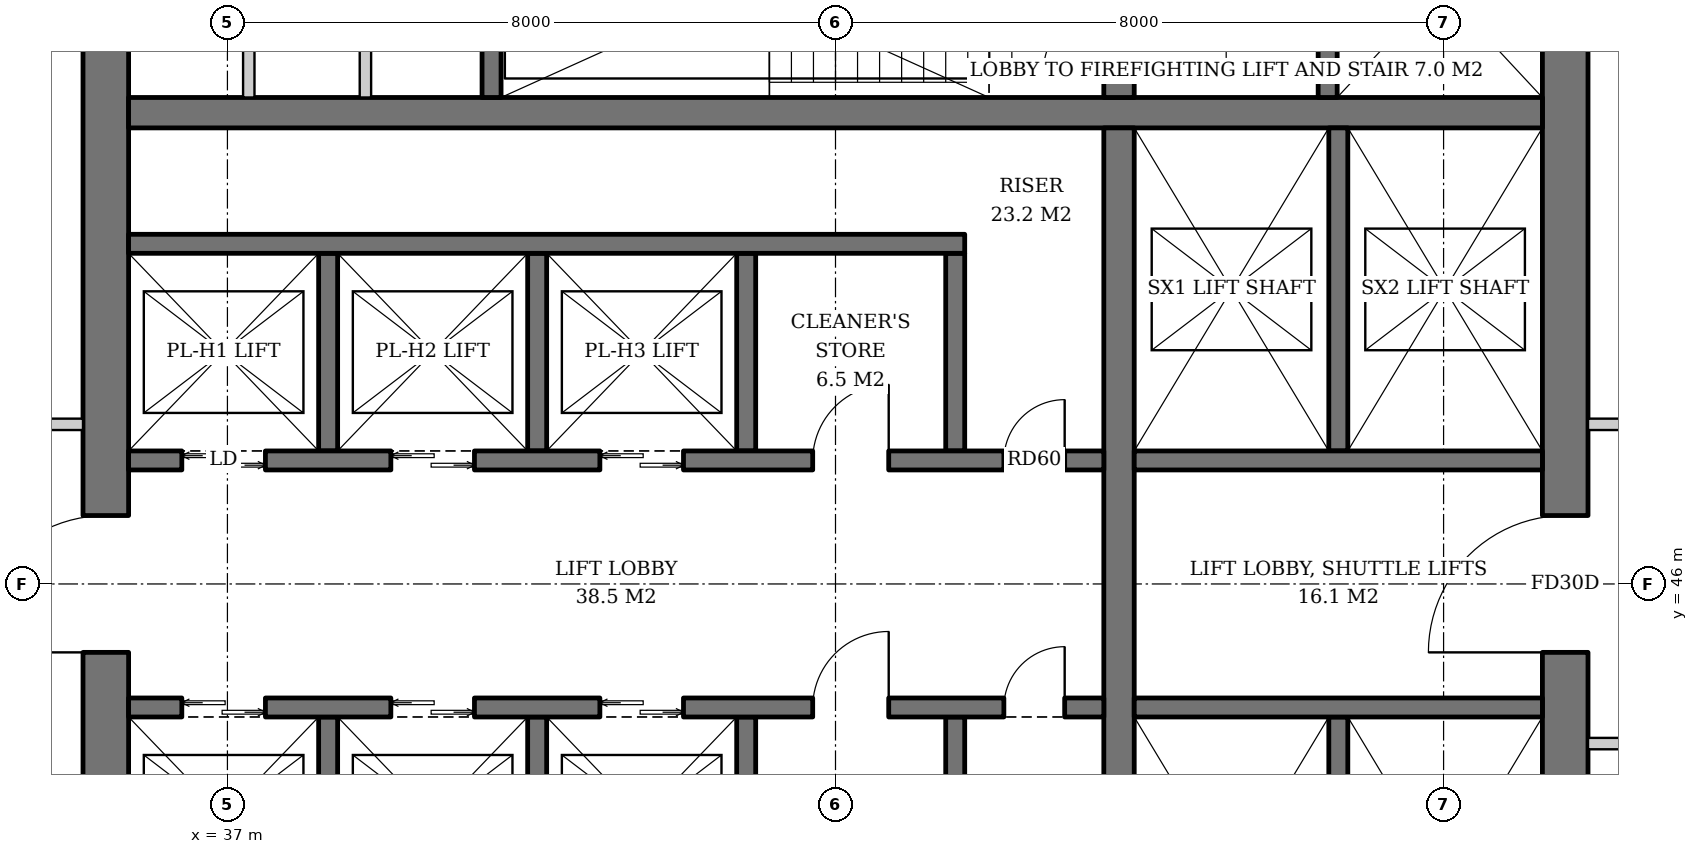
"""IFC4 building model, lengths in metres.
Left out: names, types, materials, properties, quantities, classifications, styles, units other than length and angle.
Written with IfcOpenShell. Run it as: python <this file> out.ifc"""

import sys

from ifc_helpers import new_model, si_unit, direction, frame, frame_2d, origin, place, context, subcontext, project, spatial, rectangle, extrude, element, fill, save


model = new_model("IFC4")
c1 = context("Model", 3, precision=1e-05, world=origin(), true_north=direction((0.0, 1.0)))
c2 = subcontext(c1, "Body", "Model", "MODEL_VIEW")
j1 = project(units=[si_unit("LENGTHUNIT", "METRE"), si_unit("PLANEANGLEUNIT", "RADIAN")], contexts=[c1])
p1 = place(None, origin())
s1 = spatial("IfcSite", under=j1, at=p1, CompositionType="ELEMENT")
p2 = place(p1, origin())
s2 = spatial("IfcBuilding", under=s1, at=p2, CompositionType="ELEMENT")
p3 = place(p2, frame((0.0, 0.0, 211.0)))
s3 = spatial("IfcBuildingStorey", under=s2, at=p3, CompositionType="ELEMENT", Elevation=211.0)
p4 = place(p3, frame((35.4, 36.7, 0.0), z_axis=(0.0, 0.0, 1.0), x_axis=(0.0, 1.0, 0.0)))
e1 = element("IfcWall", 1, at=p4, inside=s3, PredefinedType="SHEAR", context=c2, shape_type="SweptSolid", body=[
    extrude(rectangle(XDim=18.6, YDim=0.6, at=frame_2d((9.3, 0.0))), origin(), (0.0, 0.0, 1.0), 3.8),
])
p5 = place(p4, frame((8.4, 0.0, 0.0)))
e2 = element("IfcOpeningElement", 2, at=p5, cuts=e1, PredefinedType="OPENING", context=c2, shape_type="SweptSolid", body=[
    extrude(rectangle(XDim=1.8, YDim=2.4, at=frame_2d((0.9, 1.2))), frame((0.0, 0.31, 0.0), z_axis=(0.0, -1.0, 0.0), x_axis=(1.0, 0.0, 0.0)), (0.0, 0.0, 1.0), 0.62),
])
p6 = place(p3, frame((54.6, 36.7, 0.0), z_axis=(0.0, 0.0, 1.0), x_axis=(0.0, 1.0, 0.0)))
e3 = element("IfcWall", 3, at=p6, inside=s3, PredefinedType="SHEAR", context=c2, shape_type="SweptSolid", body=[
    extrude(rectangle(XDim=18.6, YDim=0.6, at=frame_2d((9.3, 0.0))), origin(), (0.0, 0.0, 1.0), 3.8),
])
p7 = place(p6, frame((8.4, 0.0, 0.0)))
e4 = element("IfcOpeningElement", 4, at=p7, cuts=e3, PredefinedType="OPENING", context=c2, shape_type="SweptSolid", body=[
    extrude(rectangle(XDim=1.8, YDim=2.4, at=frame_2d((0.9, 1.2))), frame((0.0, 0.31, 0.0), z_axis=(0.0, -1.0, 0.0), x_axis=(1.0, 0.0, 0.0)), (0.0, 0.0, 1.0), 0.62),
])
p8 = place(p3, frame((35.7, 52.2, 0.0), z_axis=(0.0, 0.0, 1.0), x_axis=(1.0, 0.0, 0.0)))
e5 = element("IfcWall", 5, at=p8, inside=s3, PredefinedType="SHEAR", context=c2, shape_type="SweptSolid", body=[
    extrude(rectangle(XDim=18.6, YDim=0.4, at=frame_2d((9.3, 0.0))), origin(), (0.0, 0.0, 1.0), 3.8),
])
p9 = place(p3, frame((48.73, 40.0, 0.0), z_axis=(0.0, 0.0, 1.0), x_axis=(0.0, 1.0, 0.0)))
e6 = element("IfcWall", 6, at=p9, inside=s3, PredefinedType="SHEAR", context=c2, shape_type="SweptSolid", body=[
    extrude(rectangle(XDim=12.0, YDim=0.4, at=frame_2d((6.0, 0.0))), origin(), (0.0, 0.0, 1.0), 3.8),
])
p10 = place(p3, frame((48.73, 52.4, 0.0), z_axis=(0.0, 0.0, 1.0), x_axis=(0.0, 1.0, 0.0)))
e7 = element("IfcWall", 7, at=p10, inside=s3, PredefinedType="SHEAR", context=c2, shape_type="SweptSolid", body=[
    extrude(rectangle(XDim=2.9, YDim=0.4, at=frame_2d((1.45, 0.0))), origin(), (0.0, 0.0, 1.0), 3.8),
])
p11 = place(p10, frame((0.3, 0.0, 0.0)))
e8 = element("IfcOpeningElement", 8, at=p11, cuts=e7, PredefinedType="OPENING", context=c2, shape_type="SweptSolid", body=[
    extrude(rectangle(XDim=1.0, YDim=2.1, at=frame_2d((0.5, 1.05))), frame((0.0, 0.21, 0.0), z_axis=(0.0, -1.0, 0.0), x_axis=(1.0, 0.0, 0.0)), (0.0, 0.0, 1.0), 0.42),
])
p12 = place(p3, frame((40.475, 52.4, 0.0), z_axis=(0.0, 0.0, 1.0), x_axis=(0.0, 1.0, 0.0)))
e9 = element("IfcWall", 9, at=p12, inside=s3, PredefinedType="SHEAR", context=c2, shape_type="SweptSolid", body=[
    extrude(rectangle(XDim=2.9, YDim=0.25, at=frame_2d((1.45, 0.0))), origin(), (0.0, 0.0, 1.0), 3.8),
])
p13 = place(p3, frame((51.475, 52.4, 0.0), z_axis=(0.0, 0.0, 1.0), x_axis=(0.0, 1.0, 0.0)))
e10 = element("IfcWall", 10, at=p13, inside=s3, PredefinedType="SHEAR", context=c2, shape_type="SweptSolid", body=[
    extrude(rectangle(XDim=2.9, YDim=0.25, at=frame_2d((1.45, 0.0))), origin(), (0.0, 0.0, 1.0), 3.8),
])
p14 = place(p13, frame((0.8, 0.0, 0.0)))
e11 = element("IfcOpeningElement", 11, at=p14, cuts=e10, PredefinedType="OPENING", context=c2, shape_type="SweptSolid", body=[
    extrude(rectangle(XDim=1.3, YDim=2.2, at=frame_2d((0.65, 1.1))), frame((0.0, 0.135, 0.0), z_axis=(0.0, -1.0, 0.0), x_axis=(1.0, 0.0, 0.0)), (0.0, 0.0, 1.0), 0.27),
])
for number, where, z_axis, x_axis in (
    (12, (38.325, 47.75, 0.0), (0.0, 0.0, 1.0), (0.0, 1.0, 0.0)),
    (13, (41.075, 47.75, 0.0), (0.0, 0.0, 1.0), (0.0, 1.0, 0.0)),
    (14, (43.825, 47.75, 0.0), (0.0, 0.0, 1.0), (0.0, 1.0, 0.0)),
    (15, (46.575, 47.75, 0.0), (0.0, 0.0, 1.0), (0.0, 1.0, 0.0)),
):
    element("IfcWall", number, at=place(p3, frame(where, z_axis=z_axis, x_axis=x_axis)), inside=s3, PredefinedType="SHEAR", context=c2, shape_type="SweptSolid", body=[
        extrude(rectangle(XDim=2.6, YDim=0.25, at=frame_2d((1.3, 0.0))), origin(), (0.0, 0.0, 1.0), 3.8),
    ])
p15 = place(p3, frame((35.7, 50.475, 0.0), z_axis=(0.0, 0.0, 1.0), x_axis=(1.0, 0.0, 0.0)))
e16 = element("IfcWall", 16, at=p15, inside=s3, PredefinedType="SHEAR", context=c2, shape_type="SweptSolid", body=[
    extrude(rectangle(XDim=11.0, YDim=0.25, at=frame_2d((5.5, 0.0))), origin(), (0.0, 0.0, 1.0), 3.8),
])
p16 = place(p3, frame((35.7, 47.625, 0.0), z_axis=(0.0, 0.0, 1.0), x_axis=(1.0, 0.0, 0.0)))
e17 = element("IfcWall", 17, at=p16, inside=s3, PredefinedType="SHEAR", context=c2, shape_type="SweptSolid", body=[
    extrude(rectangle(XDim=12.83, YDim=0.25, at=frame_2d((6.415, 0.0))), origin(), (0.0, 0.0, 1.0), 3.8),
])
p17 = place(p16, frame((0.7, 0.0, 0.0)))
e18 = element("IfcOpeningElement", 18, at=p17, cuts=e17, PredefinedType="OPENING", context=c2, shape_type="SweptSolid", body=[
    extrude(rectangle(XDim=1.1, YDim=2.2, at=frame_2d((0.55, 1.1))), frame((0.0, 0.135, 0.0), z_axis=(0.0, -1.0, 0.0), x_axis=(1.0, 0.0, 0.0)), (0.0, 0.0, 1.0), 0.27),
])
p18 = place(p16, frame((3.45, 0.0, 0.0)))
e19 = element("IfcOpeningElement", 19, at=p18, cuts=e17, PredefinedType="OPENING", context=c2, shape_type="SweptSolid", body=[
    extrude(rectangle(XDim=1.1, YDim=2.2, at=frame_2d((0.55, 1.1))), frame((0.0, 0.135, 0.0), z_axis=(0.0, -1.0, 0.0), x_axis=(1.0, 0.0, 0.0)), (0.0, 0.0, 1.0), 0.27),
])
p19 = place(p16, frame((6.2, 0.0, 0.0)))
e20 = element("IfcOpeningElement", 20, at=p19, cuts=e17, PredefinedType="OPENING", context=c2, shape_type="SweptSolid", body=[
    extrude(rectangle(XDim=1.1, YDim=2.2, at=frame_2d((0.55, 1.1))), frame((0.0, 0.135, 0.0), z_axis=(0.0, -1.0, 0.0), x_axis=(1.0, 0.0, 0.0)), (0.0, 0.0, 1.0), 0.27),
])
p20 = place(p16, frame((9.0, 0.0, 0.0)))
e21 = element("IfcOpeningElement", 21, at=p20, cuts=e17, PredefinedType="OPENING", context=c2, shape_type="SweptSolid", body=[
    extrude(rectangle(XDim=1.0, YDim=2.1, at=frame_2d((0.5, 1.05))), frame((0.0, 0.135, 0.0), z_axis=(0.0, -1.0, 0.0), x_axis=(1.0, 0.0, 0.0)), (0.0, 0.0, 1.0), 0.27),
])
p21 = place(p16, frame((11.515, 0.0, 0.0)))
e22 = element("IfcOpeningElement", 22, at=p21, cuts=e17, PredefinedType="OPENING", context=c2, shape_type="SweptSolid", body=[
    extrude(rectangle(XDim=0.8, YDim=2.0, at=frame_2d((0.4, 1.0))), frame((0.0, 0.135, 0.0), z_axis=(0.0, -1.0, 0.0), x_axis=(1.0, 0.0, 0.0)), (0.0, 0.0, 1.0), 0.27),
])
for number, where, z_axis, x_axis in (
    (23, (38.325, 44.25, 0.0), (0.0, 0.0, 1.0), (0.0, -1.0, 0.0)),
    (24, (41.075, 44.25, 0.0), (0.0, 0.0, 1.0), (0.0, -1.0, 0.0)),
    (25, (43.825, 44.25, 0.0), (0.0, 0.0, 1.0), (0.0, -1.0, 0.0)),
    (26, (46.575, 44.25, 0.0), (0.0, 0.0, 1.0), (0.0, -1.0, 0.0)),
):
    element("IfcWall", number, at=place(p3, frame(where, z_axis=z_axis, x_axis=x_axis)), inside=s3, PredefinedType="SHEAR", context=c2, shape_type="SweptSolid", body=[
        extrude(rectangle(XDim=2.6, YDim=0.25, at=frame_2d((1.3, 0.0))), origin(), (0.0, 0.0, 1.0), 3.8),
    ])
p22 = place(p3, frame((35.7, 44.375, 0.0), z_axis=(0.0, 0.0, 1.0), x_axis=(1.0, 0.0, 0.0)))
e27 = element("IfcWall", 27, at=p22, inside=s3, PredefinedType="SHEAR", context=c2, shape_type="SweptSolid", body=[
    extrude(rectangle(XDim=12.83, YDim=0.25, at=frame_2d((6.415, 0.0))), origin(), (0.0, 0.0, 1.0), 3.8),
])
p23 = place(p22, frame((0.7, 0.0, 0.0)))
e28 = element("IfcOpeningElement", 28, at=p23, cuts=e27, PredefinedType="OPENING", context=c2, shape_type="SweptSolid", body=[
    extrude(rectangle(XDim=1.1, YDim=2.2, at=frame_2d((0.55, 1.1))), frame((0.0, 0.135, 0.0), z_axis=(0.0, -1.0, 0.0), x_axis=(1.0, 0.0, 0.0)), (0.0, 0.0, 1.0), 0.27),
])
p24 = place(p22, frame((3.45, 0.0, 0.0)))
e29 = element("IfcOpeningElement", 29, at=p24, cuts=e27, PredefinedType="OPENING", context=c2, shape_type="SweptSolid", body=[
    extrude(rectangle(XDim=1.1, YDim=2.2, at=frame_2d((0.55, 1.1))), frame((0.0, 0.135, 0.0), z_axis=(0.0, -1.0, 0.0), x_axis=(1.0, 0.0, 0.0)), (0.0, 0.0, 1.0), 0.27),
])
p25 = place(p22, frame((6.2, 0.0, 0.0)))
e30 = element("IfcOpeningElement", 30, at=p25, cuts=e27, PredefinedType="OPENING", context=c2, shape_type="SweptSolid", body=[
    extrude(rectangle(XDim=1.1, YDim=2.2, at=frame_2d((0.55, 1.1))), frame((0.0, 0.135, 0.0), z_axis=(0.0, -1.0, 0.0), x_axis=(1.0, 0.0, 0.0)), (0.0, 0.0, 1.0), 0.27),
])
p26 = place(p22, frame((9.0, 0.0, 0.0)))
e31 = element("IfcOpeningElement", 31, at=p26, cuts=e27, PredefinedType="OPENING", context=c2, shape_type="SweptSolid", body=[
    extrude(rectangle(XDim=1.0, YDim=2.1, at=frame_2d((0.5, 1.05))), frame((0.0, 0.135, 0.0), z_axis=(0.0, -1.0, 0.0), x_axis=(1.0, 0.0, 0.0)), (0.0, 0.0, 1.0), 0.27),
])
p27 = place(p22, frame((11.515, 0.0, 0.0)))
e32 = element("IfcOpeningElement", 32, at=p27, cuts=e27, PredefinedType="OPENING", context=c2, shape_type="SweptSolid", body=[
    extrude(rectangle(XDim=0.8, YDim=2.0, at=frame_2d((0.4, 1.0))), frame((0.0, 0.135, 0.0), z_axis=(0.0, -1.0, 0.0), x_axis=(1.0, 0.0, 0.0)), (0.0, 0.0, 1.0), 0.27),
])
p28 = place(p3, frame((51.615, 47.75, 0.0), z_axis=(0.0, 0.0, 1.0), x_axis=(0.0, 1.0, 0.0)))
e33 = element("IfcWall", 33, at=p28, inside=s3, PredefinedType="SHEAR", context=c2, shape_type="SweptSolid", body=[
    extrude(rectangle(XDim=4.25, YDim=0.25, at=frame_2d((2.125, 0.0))), origin(), (0.0, 0.0, 1.0), 3.8),
])
p29 = place(p3, frame((48.93, 47.625, 0.0), z_axis=(0.0, 0.0, 1.0), x_axis=(1.0, 0.0, 0.0)))
e34 = element("IfcWall", 34, at=p29, inside=s3, PredefinedType="SHEAR", context=c2, shape_type="SweptSolid", body=[
    extrude(rectangle(XDim=5.37, YDim=0.25, at=frame_2d((2.685, 0.0))), origin(), (0.0, 0.0, 1.0), 3.8),
])
p30 = place(p3, frame((51.615, 44.25, 0.0), z_axis=(0.0, 0.0, 1.0), x_axis=(0.0, -1.0, 0.0)))
e35 = element("IfcWall", 35, at=p30, inside=s3, PredefinedType="SHEAR", context=c2, shape_type="SweptSolid", body=[
    extrude(rectangle(XDim=4.25, YDim=0.25, at=frame_2d((2.125, 0.0))), origin(), (0.0, 0.0, 1.0), 3.8),
])
p31 = place(p3, frame((48.93, 44.375, 0.0), z_axis=(0.0, 0.0, 1.0), x_axis=(1.0, 0.0, 0.0)))
e36 = element("IfcWall", 36, at=p31, inside=s3, PredefinedType="SHEAR", context=c2, shape_type="SweptSolid", body=[
    extrude(rectangle(XDim=5.37, YDim=0.25, at=frame_2d((2.685, 0.0))), origin(), (0.0, 0.0, 1.0), 3.8),
])
for number, where, z_axis, x_axis in (
    (37, (37.281, 52.4, 0.0), (0.0, 0.0, 1.0), (0.0, 1.0, 0.0)),
    (38, (38.815, 52.4, 0.0), (0.0, 0.0, 1.0), (0.0, 1.0, 0.0)),
):
    element("IfcWall", number, at=place(p3, frame(where, z_axis=z_axis, x_axis=x_axis)), inside=s3, PredefinedType="SOLIDWALL", context=c2, shape_type="SweptSolid", body=[
        extrude(rectangle(XDim=2.9, YDim=0.15, at=frame_2d((1.45, 0.0))), origin(), (0.0, 0.0, 1.0), 3.62),
    ])
p32 = place(p3, frame((54.9, 43.9, 0.0), z_axis=(0.0, 0.0, 1.0), x_axis=(1.0, 0.0, 0.0)))
e39 = element("IfcWall", 39, at=p32, inside=s3, PredefinedType="PARTITIONING", context=c2, shape_type="SweptSolid", body=[
    extrude(rectangle(XDim=2.325, YDim=0.15, at=frame_2d((1.163, 0.0))), origin(), (0.0, 0.0, 1.0), 3.62),
])
p33 = place(p3, frame((54.9, 48.1, 0.0), z_axis=(0.0, 0.0, 1.0), x_axis=(1.0, 0.0, 0.0)))
e40 = element("IfcWall", 40, at=p33, inside=s3, PredefinedType="PARTITIONING", context=c2, shape_type="SweptSolid", body=[
    extrude(rectangle(XDim=2.325, YDim=0.15, at=frame_2d((1.163, 0.0))), origin(), (0.0, 0.0, 1.0), 2.867),
])
p34 = place(p3, frame((35.1, 48.1, 0.0), z_axis=(0.0, 0.0, 1.0), x_axis=(-1.0, 0.0, 0.0)))
e41 = element("IfcWall", 41, at=p34, inside=s3, PredefinedType="PARTITIONING", context=c2, shape_type="SweptSolid", body=[
    extrude(rectangle(XDim=2.325, YDim=0.15, at=frame_2d((1.163, 0.0))), origin(), (0.0, 0.0, 1.0), 3.62),
])
p35 = place(p17, origin())
e42 = element("IfcDoor", 42, at=p35, inside=s3, OperationType="DOUBLE_DOOR_SLIDING", PredefinedType="DOOR", context=c2, shape_type="SweptSolid", body=[
    extrude(rectangle(XDim=1.1, YDim=2.2, at=frame_2d((0.55, 1.1))), frame((0.0, 0.025, 0.0), z_axis=(0.0, -1.0, 0.0), x_axis=(1.0, 0.0, 0.0)), (0.0, 0.0, 1.0), 0.05),
])
fill(e18, e42)
p36 = place(p18, origin())
e43 = element("IfcDoor", 43, at=p36, inside=s3, OperationType="DOUBLE_DOOR_SLIDING", PredefinedType="DOOR", context=c2, shape_type="SweptSolid", body=[
    extrude(rectangle(XDim=1.1, YDim=2.2, at=frame_2d((0.55, 1.1))), frame((0.0, 0.025, 0.0), z_axis=(0.0, -1.0, 0.0), x_axis=(1.0, 0.0, 0.0)), (0.0, 0.0, 1.0), 0.05),
])
fill(e19, e43)
p37 = place(p19, origin())
e44 = element("IfcDoor", 44, at=p37, inside=s3, OperationType="DOUBLE_DOOR_SLIDING", PredefinedType="DOOR", context=c2, shape_type="SweptSolid", body=[
    extrude(rectangle(XDim=1.1, YDim=2.2, at=frame_2d((0.55, 1.1))), frame((0.0, 0.025, 0.0), z_axis=(0.0, -1.0, 0.0), x_axis=(1.0, 0.0, 0.0)), (0.0, 0.0, 1.0), 0.05),
])
fill(e20, e44)
p38 = place(p20, origin())
e45 = element("IfcDoor", 45, at=p38, inside=s3, OperationType="SINGLE_SWING_RIGHT", PredefinedType="DOOR", context=c2, shape_type="SweptSolid", body=[
    extrude(rectangle(XDim=1.0, YDim=2.1, at=frame_2d((0.5, 1.05))), frame((0.0, 0.025, 0.0), z_axis=(0.0, -1.0, 0.0), x_axis=(1.0, 0.0, 0.0)), (0.0, 0.0, 1.0), 0.05),
])
fill(e21, e45)
p39 = place(p21, origin())
e46 = element("IfcDoor", 46, at=p39, inside=s3, OperationType="SINGLE_SWING_RIGHT", PredefinedType="DOOR", context=c2, shape_type="SweptSolid", body=[
    extrude(rectangle(XDim=0.8, YDim=2.0, at=frame_2d((0.4, 1.0))), frame((0.0, 0.025, 0.0), z_axis=(0.0, -1.0, 0.0), x_axis=(1.0, 0.0, 0.0)), (0.0, 0.0, 1.0), 0.05),
])
fill(e22, e46)
p40 = place(p23, origin())
e47 = element("IfcDoor", 47, at=p40, inside=s3, OperationType="DOUBLE_DOOR_SLIDING", PredefinedType="DOOR", context=c2, shape_type="SweptSolid", body=[
    extrude(rectangle(XDim=1.1, YDim=2.2, at=frame_2d((0.55, 1.1))), frame((0.0, 0.025, 0.0), z_axis=(0.0, -1.0, 0.0), x_axis=(1.0, 0.0, 0.0)), (0.0, 0.0, 1.0), 0.05),
])
fill(e28, e47)
p41 = place(p24, origin())
e48 = element("IfcDoor", 48, at=p41, inside=s3, OperationType="DOUBLE_DOOR_SLIDING", PredefinedType="DOOR", context=c2, shape_type="SweptSolid", body=[
    extrude(rectangle(XDim=1.1, YDim=2.2, at=frame_2d((0.55, 1.1))), frame((0.0, 0.025, 0.0), z_axis=(0.0, -1.0, 0.0), x_axis=(1.0, 0.0, 0.0)), (0.0, 0.0, 1.0), 0.05),
])
fill(e29, e48)
p42 = place(p25, origin())
e49 = element("IfcDoor", 49, at=p42, inside=s3, OperationType="DOUBLE_DOOR_SLIDING", PredefinedType="DOOR", context=c2, shape_type="SweptSolid", body=[
    extrude(rectangle(XDim=1.1, YDim=2.2, at=frame_2d((0.55, 1.1))), frame((0.0, 0.025, 0.0), z_axis=(0.0, -1.0, 0.0), x_axis=(1.0, 0.0, 0.0)), (0.0, 0.0, 1.0), 0.05),
])
fill(e30, e49)
p43 = place(p26, origin())
e50 = element("IfcDoor", 50, at=p43, inside=s3, OperationType="SINGLE_SWING_RIGHT", PredefinedType="DOOR", context=c2, shape_type="SweptSolid", body=[
    extrude(rectangle(XDim=1.0, YDim=2.1, at=frame_2d((0.5, 1.05))), frame((0.0, 0.025, 0.0), z_axis=(0.0, -1.0, 0.0), x_axis=(1.0, 0.0, 0.0)), (0.0, 0.0, 1.0), 0.05),
])
fill(e31, e50)
p44 = place(p27, origin())
e51 = element("IfcDoor", 51, at=p44, inside=s3, OperationType="SINGLE_SWING_RIGHT", PredefinedType="DOOR", context=c2, shape_type="SweptSolid", body=[
    extrude(rectangle(XDim=0.8, YDim=2.0, at=frame_2d((0.4, 1.0))), frame((0.0, 0.025, 0.0), z_axis=(0.0, -1.0, 0.0), x_axis=(1.0, 0.0, 0.0)), (0.0, 0.0, 1.0), 0.05),
])
fill(e32, e51)
p45 = place(p11, origin())
e52 = element("IfcDoor", 52, at=p45, inside=s3, OperationType="SINGLE_SWING_LEFT", PredefinedType="DOOR", context=c2, shape_type="SweptSolid", body=[
    extrude(rectangle(XDim=1.0, YDim=2.1, at=frame_2d((0.5, 1.05))), frame((0.0, 0.025, 0.0), z_axis=(0.0, -1.0, 0.0), x_axis=(1.0, 0.0, 0.0)), (0.0, 0.0, 1.0), 0.05),
])
fill(e8, e52)
p46 = place(p5, origin())
e53 = element("IfcDoor", 53, at=p46, inside=s3, OperationType="DOUBLE_DOOR_SINGLE_SWING", PredefinedType="DOOR", context=c2, shape_type="SweptSolid", body=[
    extrude(rectangle(XDim=1.8, YDim=2.4, at=frame_2d((0.9, 1.2))), frame((0.0, 0.025, 0.0), z_axis=(0.0, -1.0, 0.0), x_axis=(1.0, 0.0, 0.0)), (0.0, 0.0, 1.0), 0.05),
])
fill(e2, e53)
p47 = place(p7, origin())
e54 = element("IfcDoor", 54, at=p47, inside=s3, OperationType="DOUBLE_DOOR_SINGLE_SWING", PredefinedType="DOOR", context=c2, shape_type="SweptSolid", body=[
    extrude(rectangle(XDim=1.8, YDim=2.4, at=frame_2d((0.9, 1.2))), frame((0.0, 0.025, 0.0), z_axis=(0.0, -1.0, 0.0), x_axis=(1.0, 0.0, 0.0)), (0.0, 0.0, 1.0), 0.05),
])
fill(e4, e54)
save(model, sys.argv[1])
